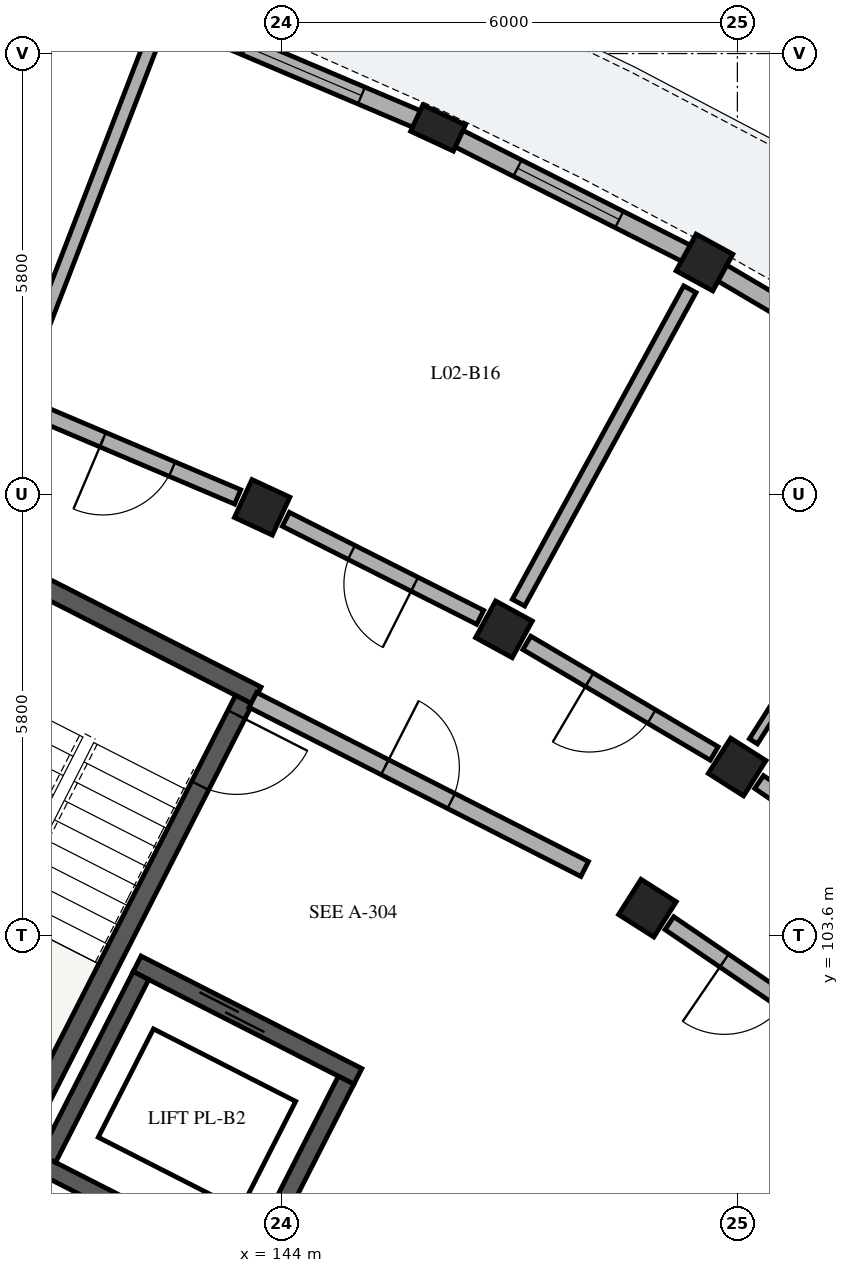
"""IFC4 building model, lengths in metres.
Left out: names, types, materials, properties, quantities, classifications, styles, units other than length and angle.
Written with IfcOpenShell. Run it as: python <this file> out.ifc"""

import sys

from ifc_helpers import new_model, si_unit, direction, frame, frame_2d, origin, origin_2d, place, context, subcontext, project, spatial, rectangle, extrude, element, fill, save


model = new_model("IFC4")
c1 = context("Model", 3, precision=1e-05, world=origin(), true_north=direction((0.0, 1.0)))
c2 = subcontext(c1, "Body", "Model", "MODEL_VIEW")
j1 = project(units=[si_unit("LENGTHUNIT", "METRE"), si_unit("PLANEANGLEUNIT", "RADIAN")], contexts=[c1])
p1 = place(None, origin())
s1 = spatial("IfcSite", under=j1, at=p1, CompositionType="ELEMENT")
p2 = place(p1, origin())
s2 = spatial("IfcBuilding", under=s1, at=p2, CompositionType="ELEMENT")
p3 = place(p2, frame((0.0, 0.0, 8.84)))
s3 = spatial("IfcBuildingStorey", under=s2, at=p3, CompositionType="ELEMENT", Elevation=8.84)
p4 = place(p3, frame((140.629, 108.307, 0.0), z_axis=(0.0, 0.0, 1.0), x_axis=(0.891032414707, -0.453939683153, 0.0)))
e1 = element("IfcWall", 1, at=p4, inside=s3, PredefinedType="SHEAR", context=c2, shape_type="SweptSolid", body=[
    extrude(rectangle(XDim=3.42, YDim=0.25, at=frame_2d((1.71, 0.0))), origin(), (0.0, 0.0, 1.0), 3.11),
])
p5 = place(p3, frame((143.509, 106.699, 0.0), z_axis=(0.0, 0.0, 1.0), x_axis=(-0.453992276384, -0.891005618941, 0.0)))
e2 = element("IfcWall", 2, at=p5, inside=s3, PredefinedType="SHEAR", context=c2, shape_type="SweptSolid", body=[
    extrude(rectangle(XDim=6.6, YDim=0.25, at=frame_2d((3.3, 0.0))), origin(), (0.0, 0.0, 1.0), 3.11),
])
p6 = place(p5, frame((0.22, 0.0, 0.0)))
e3 = element("IfcOpeningElement", 3, at=p6, cuts=e2, PredefinedType="OPENING", context=c2, shape_type="SweptSolid", body=[
    extrude(rectangle(XDim=1.05, YDim=2.15, at=frame_2d((0.525, 1.075))), frame((0.0, 0.135, 0.0), z_axis=(0.0, -1.0, 0.0), x_axis=(1.0, 0.0, 0.0)), (0.0, 0.0, 1.0), 0.27),
])
p7 = place(p3, frame((142.103, 103.224, 0.0), z_axis=(0.0, 0.0, 1.0), x_axis=(0.891001200497, -0.454000947921, 0.0)))
e4 = element("IfcWall", 4, at=p7, inside=s3, PredefinedType="SHEAR", context=c2, shape_type="SweptSolid", body=[
    extrude(rectangle(XDim=3.26, YDim=0.23, at=frame_2d((1.63, 0.0))), origin(), (0.0, 0.0, 1.0), 3.11),
])
p8 = place(p7, frame((0.9, 0.0, 0.0)))
e5 = element("IfcOpeningElement", 5, at=p8, cuts=e4, PredefinedType="OPENING", context=c2, shape_type="SweptSolid", body=[
    extrude(rectangle(XDim=1.0, YDim=2.15, at=frame_2d((0.5, 1.075))), frame((0.0, 0.125, 0.0), z_axis=(0.0, -1.0, 0.0), x_axis=(1.0, 0.0, 0.0)), (0.0, 0.0, 1.0), 0.25),
])
p9 = place(p3, frame((140.772, 100.613, 0.0), z_axis=(0.0, 0.0, 1.0), x_axis=(0.891016635648, -0.453970654337, 0.0)))
e6 = element("IfcWall", 6, at=p9, inside=s3, PredefinedType="SHEAR", context=c2, shape_type="SweptSolid", body=[
    extrude(rectangle(XDim=3.26, YDim=0.23, at=frame_2d((1.63, 0.0))), origin(), (0.0, 0.0, 1.0), 3.11),
])
for number, where, z_axis, x_axis in (
    (7, (142.153, 103.069, 0.0), (0.0, 0.0, 1.0), (-0.454, -0.891, 0.0)),
    (8, (144.853, 101.694, 0.0), (0.0, 0.0, 1.0), (-0.454, -0.891, 0.0)),
):
    element("IfcWall", number, at=place(p3, frame(where, z_axis=z_axis, x_axis=x_axis)), inside=s3, PredefinedType="SHEAR", context=c2, shape_type="SweptSolid", body=[
        extrude(rectangle(XDim=2.7, YDim=0.23, at=frame_2d((1.35, 0.0))), origin(), (0.0, 0.0, 1.0), 3.11),
    ])
for number, where, z_axis, x_axis in (
    (9, (148.817, 103.957, 0.0), (0.0, 0.0, 1.0), (0.536, 0.844, 0.0)),
    (10, (149.997, 105.813, 0.0), (0.0, 0.0, 1.0), (0.536, 0.844, 0.0)),
    (11, (146.928, 107.625, 0.0), (0.0, 0.0, 1.0), (0.48, 0.877, 0.0)),
    (12, (149.567, 112.451, 0.0), (0.0, 0.0, 1.0), (0.48, 0.877, 0.0)),
    (13, (143.748, 109.23, 0.0), (0.0, 0.0, 1.0), (0.421, 0.907, 0.0)),
):
    element("IfcColumn", number, at=place(p3, frame(where, z_axis=z_axis, x_axis=x_axis)), inside=s3, PredefinedType="COLUMN", context=c2, shape_type="SweptSolid", body=[
        extrude(rectangle(XDim=0.55, YDim=0.55, at=origin_2d()), origin(), (0.0, 0.0, 1.0), 3.105),
    ])
p10 = place(p3, frame((146.062, 114.219, 0.0), z_axis=(0.0, 0.0, 1.0), x_axis=(0.420859860775, 0.907125668024, 0.0)))
e14 = element("IfcColumn", 14, at=p10, inside=s3, PredefinedType="PILASTER", context=c2, shape_type="SweptSolid", body=[
    extrude(rectangle(XDim=0.38, YDim=0.62, at=origin_2d()), origin(), (0.0, 0.0, 1.0), 3.105),
])
p11 = place(p3, frame((152.81, 110.536, 0.0), z_axis=(0.0, 0.0, 1.0), x_axis=(-0.861136297738, 0.508374150324, 0.0)))
e15 = element("IfcWall", 15, at=p11, inside=s3, PredefinedType="SOLIDWALL", context=c2, shape_type="SweptSolid", body=[
    extrude(rectangle(XDim=3.521, YDim=0.24, at=frame_2d((1.76, 0.0))), origin(), (0.0, 0.0, 1.0), 2.355),
])
p12 = place(p11, frame((1.085, 0.0, 0.35)))
e16 = element("IfcOpeningElement", 16, at=p12, cuts=e15, PredefinedType="OPENING", context=c2, shape_type="SweptSolid", body=[
    extrude(rectangle(XDim=1.35, YDim=1.65, at=frame_2d((0.675, 0.825))), frame((0.0, 0.13, 0.0), z_axis=(0.0, -1.0, 0.0), x_axis=(1.0, 0.0, 0.0)), (0.0, 0.0, 1.0), 0.26),
])
p13 = place(p3, frame((149.348, 112.561, 0.0), z_axis=(0.0, 0.0, 1.0), x_axis=(-0.892756700232, 0.450539092855, 0.0)))
e17 = element("IfcWall", 17, at=p13, inside=s3, PredefinedType="SOLIDWALL", context=c2, shape_type="SweptSolid", body=[
    extrude(rectangle(XDim=3.521, YDim=0.24, at=frame_2d((1.76, 0.0))), origin(), (0.0, 0.0, 1.0), 2.355),
])
p14 = place(p13, frame((1.01, 0.0, 0.35)))
e18 = element("IfcOpeningElement", 18, at=p14, cuts=e17, PredefinedType="OPENING", context=c2, shape_type="SweptSolid", body=[
    extrude(rectangle(XDim=1.5, YDim=1.7, at=frame_2d((0.75, 0.85))), frame((0.0, 0.13, 0.0), z_axis=(0.0, -1.0, 0.0), x_axis=(1.0, 0.0, 0.0)), (0.0, 0.0, 1.0), 0.26),
])
p15 = place(p3, frame((145.915, 114.282, 0.0), z_axis=(0.0, 0.0, 1.0), x_axis=(-0.920502438884, 0.390736816807, 0.0)))
e19 = element("IfcWall", 19, at=p15, inside=s3, PredefinedType="SOLIDWALL", context=c2, shape_type="SweptSolid", body=[
    extrude(rectangle(XDim=3.521, YDim=0.24, at=frame_2d((1.76, 0.0))), origin(), (0.0, 0.0, 1.0), 2.355),
])
p16 = place(p15, frame((0.935, 0.0, 0.35)))
e20 = element("IfcOpeningElement", 20, at=p16, cuts=e19, PredefinedType="OPENING", context=c2, shape_type="SweptSolid", body=[
    extrude(rectangle(XDim=1.65, YDim=1.8, at=frame_2d((0.825, 0.9))), frame((0.0, 0.13, 0.0), z_axis=(0.0, -1.0, 0.0), x_axis=(1.0, 0.0, 0.0)), (0.0, 0.0, 1.0), 0.26),
])
p17 = place(p3, frame((143.625, 106.696, 0.0), z_axis=(0.0, 0.0, 1.0), x_axis=(0.891003372311, -0.453996685595, 0.0)))
e21 = element("IfcWall", 21, at=p17, inside=s3, PredefinedType="PARTITIONING", context=c2, shape_type="SweptSolid", body=[
    extrude(rectangle(XDim=4.9, YDim=0.22, at=frame_2d((2.45, 0.0))), origin(), (0.0, 0.0, 1.0), 2.34),
])
p18 = place(p17, frame((1.95, 0.0, 0.0)))
e22 = element("IfcOpeningElement", 22, at=p18, cuts=e21, PredefinedType="OPENING", context=c2, shape_type="SweptSolid", body=[
    extrude(rectangle(XDim=0.98, YDim=2.14, at=frame_2d((0.49, 1.07))), frame((0.0, 0.12, 0.0), z_axis=(0.0, -1.0, 0.0), x_axis=(1.0, 0.0, 0.0)), (0.0, 0.0, 1.0), 0.24),
])
p19 = place(p3, frame((152.65, 104.001, 0.0), z_axis=(0.0, 0.0, 1.0), x_axis=(-0.825779671787, 0.563992848947, 0.0)))
e23 = element("IfcWall", 23, at=p19, inside=s3, PredefinedType="PARTITIONING", context=c2, shape_type="SweptSolid", body=[
    extrude(rectangle(XDim=2.863, YDim=0.205, at=frame_2d((1.432, 0.0))), origin(), (0.0, 0.0, 1.0), 2.37),
])
p20 = place(p19, frame((0.947, 0.0, 0.0)))
e24 = element("IfcOpeningElement", 24, at=p20, cuts=e23, PredefinedType="OPENING", context=c2, shape_type="SweptSolid", body=[
    extrude(rectangle(XDim=0.97, YDim=2.15, at=frame_2d((0.485, 1.075))), frame((0.0, 0.113, 0.0), z_axis=(0.0, -1.0, 0.0), x_axis=(1.0, 0.0, 0.0)), (0.0, 0.0, 1.0), 0.225),
])
p21 = place(p3, frame((151.35, 102.226, 0.0), z_axis=(0.0, 0.0, 1.0), x_axis=(-0.825752009056, 0.56403334967, 0.0)))
e25 = element("IfcWall", 25, at=p21, inside=s3, PredefinedType="PARTITIONING", context=c2, shape_type="SweptSolid", body=[
    extrude(rectangle(XDim=2.718, YDim=0.205, at=frame_2d((1.359, 0.0))), origin(), (0.0, 0.0, 1.0), 2.37),
])
p22 = place(p21, frame((0.874, 0.0, 0.0)))
e26 = element("IfcOpeningElement", 26, at=p22, cuts=e25, PredefinedType="OPENING", context=c2, shape_type="SweptSolid", body=[
    extrude(rectangle(XDim=0.97, YDim=2.15, at=frame_2d((0.485, 1.075))), frame((0.0, 0.113, 0.0), z_axis=(0.0, -1.0, 0.0), x_axis=(1.0, 0.0, 0.0)), (0.0, 0.0, 1.0), 0.225),
])
p23 = place(p3, frame((150.211, 106.151, 0.0), z_axis=(0.0, 0.0, 1.0), x_axis=(0.536492262982, 0.843905238614, 0.0)))
e27 = element("IfcWall", 27, at=p23, inside=s3, PredefinedType="PARTITIONING", context=c2, shape_type="SweptSolid", body=[
    extrude(rectangle(XDim=4.7, YDim=0.125, at=frame_2d((2.35, 0.0))), origin(), (0.0, 0.0, 1.0), 2.37),
])
p24 = place(p23, frame((1.895, 0.0, 0.0)))
e28 = element("IfcOpeningElement", 28, at=p24, cuts=e27, PredefinedType="OPENING", context=c2, shape_type="SweptSolid", body=[
    extrude(rectangle(XDim=0.91, YDim=2.1, at=frame_2d((0.455, 1.05))), frame((0.0, 0.073, 0.0), z_axis=(0.0, -1.0, 0.0), x_axis=(1.0, 0.0, 0.0)), (0.0, 0.0, 1.0), 0.145),
])
p25 = place(p3, frame((149.695, 105.991, 0.0), z_axis=(0.0, 0.0, 1.0), x_axis=(-0.861113214678, 0.508413248753, 0.0)))
e29 = element("IfcWall", 29, at=p25, inside=s3, PredefinedType="PARTITIONING", context=c2, shape_type="SweptSolid", body=[
    extrude(rectangle(XDim=2.863, YDim=0.205, at=frame_2d((1.432, 0.0))), origin(), (0.0, 0.0, 1.0), 2.37),
])
p26 = place(p25, frame((0.957, 0.0, 0.0)))
e30 = element("IfcOpeningElement", 30, at=p26, cuts=e29, PredefinedType="OPENING", context=c2, shape_type="SweptSolid", body=[
    extrude(rectangle(XDim=0.95, YDim=2.13, at=frame_2d((0.475, 1.065))), frame((0.0, 0.113, 0.0), z_axis=(0.0, -1.0, 0.0), x_axis=(1.0, 0.0, 0.0)), (0.0, 0.0, 1.0), 0.225),
])
p27 = place(p3, frame((147.12, 107.976, 0.0), z_axis=(0.0, 0.0, 1.0), x_axis=(0.479721743761, 0.877420679357, 0.0)))
e31 = element("IfcWall", 31, at=p27, inside=s3, PredefinedType="PARTITIONING", context=c2, shape_type="SweptSolid", body=[
    extrude(rectangle(XDim=4.7, YDim=0.185, at=frame_2d((2.35, 0.0))), origin(), (0.0, 0.0, 1.0), 2.37),
])
p28 = place(p3, frame((146.616, 107.782, 0.0), z_axis=(0.0, 0.0, 1.0), x_axis=(-0.89273239336, 0.450587254419, 0.0)))
e32 = element("IfcWall", 32, at=p28, inside=s3, PredefinedType="PARTITIONING", context=c2, shape_type="SweptSolid", body=[
    extrude(rectangle(XDim=2.863, YDim=0.205, at=frame_2d((1.432, 0.0))), origin(), (0.0, 0.0, 1.0), 2.37),
])
p29 = place(p28, frame((0.967, 0.0, 0.0)))
e33 = element("IfcOpeningElement", 33, at=p29, cuts=e32, PredefinedType="OPENING", context=c2, shape_type="SweptSolid", body=[
    extrude(rectangle(XDim=0.93, YDim=2.12, at=frame_2d((0.465, 1.06))), frame((0.0, 0.113, 0.0), z_axis=(0.0, -1.0, 0.0), x_axis=(1.0, 0.0, 0.0)), (0.0, 0.0, 1.0), 0.225),
])
p30 = place(p3, frame((143.425, 109.367, 0.0), z_axis=(0.0, 0.0, 1.0), x_axis=(-0.920511160294, 0.390716270168, 0.0)))
e34 = element("IfcWall", 34, at=p30, inside=s3, PredefinedType="PARTITIONING", context=c2, shape_type="SweptSolid", body=[
    extrude(rectangle(XDim=2.863, YDim=0.205, at=frame_2d((1.432, 0.0))), origin(), (0.0, 0.0, 1.0), 2.37),
])
p31 = place(p30, frame((0.937, 0.0, 0.0)))
e35 = element("IfcOpeningElement", 35, at=p31, cuts=e34, PredefinedType="OPENING", context=c2, shape_type="SweptSolid", body=[
    extrude(rectangle(XDim=0.99, YDim=2.16, at=frame_2d((0.495, 1.08))), frame((0.0, 0.113, 0.0), z_axis=(0.0, -1.0, 0.0), x_axis=(1.0, 0.0, 0.0)), (0.0, 0.0, 1.0), 0.225),
])
p32 = place(p3, frame((140.612, 110.996, 0.0), z_axis=(0.0, 0.0, 1.0), x_axis=(0.360186633854, 0.932880264982, 0.0)))
e36 = element("IfcWall", 36, at=p32, inside=s3, PredefinedType="PARTITIONING", context=c2, shape_type="SweptSolid", body=[
    extrude(rectangle(XDim=4.7, YDim=0.185, at=frame_2d((2.35, 0.0))), origin(), (0.0, 0.0, 1.0), 2.37),
])
p33 = place(p14, origin())
e37 = element("IfcWindow", 37, at=p33, inside=s3, PartitioningType="SINGLE_PANEL", PredefinedType="WINDOW", context=c2, shape_type="SweptSolid", body=[
    extrude(rectangle(XDim=1.5, YDim=1.7, at=frame_2d((0.75, 0.85))), frame((0.0, 0.03, 0.0), z_axis=(0.0, -1.0, 0.0), x_axis=(1.0, 0.0, 0.0)), (0.0, 0.0, 1.0), 0.06),
])
fill(e18, e37)
p34 = place(p16, origin())
e38 = element("IfcWindow", 38, at=p34, inside=s3, PartitioningType="SINGLE_PANEL", PredefinedType="WINDOW", context=c2, shape_type="SweptSolid", body=[
    extrude(rectangle(XDim=1.65, YDim=1.8, at=frame_2d((0.825, 0.9))), frame((0.0, 0.03, 0.0), z_axis=(0.0, -1.0, 0.0), x_axis=(1.0, 0.0, 0.0)), (0.0, 0.0, 1.0), 0.06),
])
fill(e20, e38)
p35 = place(p6, origin())
e39 = element("IfcDoor", 39, at=p35, inside=s3, OperationType="SINGLE_SWING_LEFT", PredefinedType="DOOR", context=c2, shape_type="SweptSolid", body=[
    extrude(rectangle(XDim=1.05, YDim=2.15, at=frame_2d((0.525, 1.075))), frame((0.0, 0.025, 0.0), z_axis=(0.0, -1.0, 0.0), x_axis=(1.0, 0.0, 0.0)), (0.0, 0.0, 1.0), 0.05),
])
fill(e3, e39)
p36 = place(p8, origin())
e40 = element("IfcDoor", 40, at=p36, inside=s3, OperationType="DOUBLE_DOOR_SLIDING", PredefinedType="DOOR", context=c2, shape_type="SweptSolid", body=[
    extrude(rectangle(XDim=1.0, YDim=2.15, at=frame_2d((0.5, 1.075))), frame((0.0, 0.025, 0.0), z_axis=(0.0, -1.0, 0.0), x_axis=(1.0, 0.0, 0.0)), (0.0, 0.0, 1.0), 0.05),
])
fill(e5, e40)
p37 = place(p18, origin())
e41 = element("IfcDoor", 41, at=p37, inside=s3, OperationType="SINGLE_SWING_LEFT", PredefinedType="DOOR", context=c2, shape_type="SweptSolid", body=[
    extrude(rectangle(XDim=0.98, YDim=2.14, at=frame_2d((0.49, 1.07))), frame((0.0, 0.025, 0.0), z_axis=(0.0, -1.0, 0.0), x_axis=(1.0, 0.0, 0.0)), (0.0, 0.0, 1.0), 0.05),
])
fill(e22, e41)
p38 = place(p22, origin())
e42 = element("IfcDoor", 42, at=p38, inside=s3, OperationType="SINGLE_SWING_RIGHT", PredefinedType="DOOR", context=c2, shape_type="SweptSolid", body=[
    extrude(rectangle(XDim=0.97, YDim=2.15, at=frame_2d((0.485, 1.075))), frame((0.0, 0.025, 0.0), z_axis=(0.0, -1.0, 0.0), x_axis=(1.0, 0.0, 0.0)), (0.0, 0.0, 1.0), 0.05),
])
fill(e26, e42)
p39 = place(p26, origin())
e43 = element("IfcDoor", 43, at=p39, inside=s3, OperationType="SINGLE_SWING_RIGHT", PredefinedType="DOOR", context=c2, shape_type="SweptSolid", body=[
    extrude(rectangle(XDim=0.95, YDim=2.13, at=frame_2d((0.475, 1.065))), frame((0.0, 0.025, 0.0), z_axis=(0.0, -1.0, 0.0), x_axis=(1.0, 0.0, 0.0)), (0.0, 0.0, 1.0), 0.05),
])
fill(e30, e43)
p40 = place(p29, origin())
e44 = element("IfcDoor", 44, at=p40, inside=s3, OperationType="SINGLE_SWING_LEFT", PredefinedType="DOOR", context=c2, shape_type="SweptSolid", body=[
    extrude(rectangle(XDim=0.93, YDim=2.12, at=frame_2d((0.465, 1.06))), frame((0.0, 0.025, 0.0), z_axis=(0.0, -1.0, 0.0), x_axis=(1.0, 0.0, 0.0)), (0.0, 0.0, 1.0), 0.05),
])
fill(e33, e44)
p41 = place(p31, origin())
e45 = element("IfcDoor", 45, at=p41, inside=s3, OperationType="SINGLE_SWING_RIGHT", PredefinedType="DOOR", context=c2, shape_type="SweptSolid", body=[
    extrude(rectangle(XDim=0.99, YDim=2.16, at=frame_2d((0.495, 1.08))), frame((0.0, 0.025, 0.0), z_axis=(0.0, -1.0, 0.0), x_axis=(1.0, 0.0, 0.0)), (0.0, 0.0, 1.0), 0.05),
])
fill(e35, e45)
save(model, sys.argv[1])
